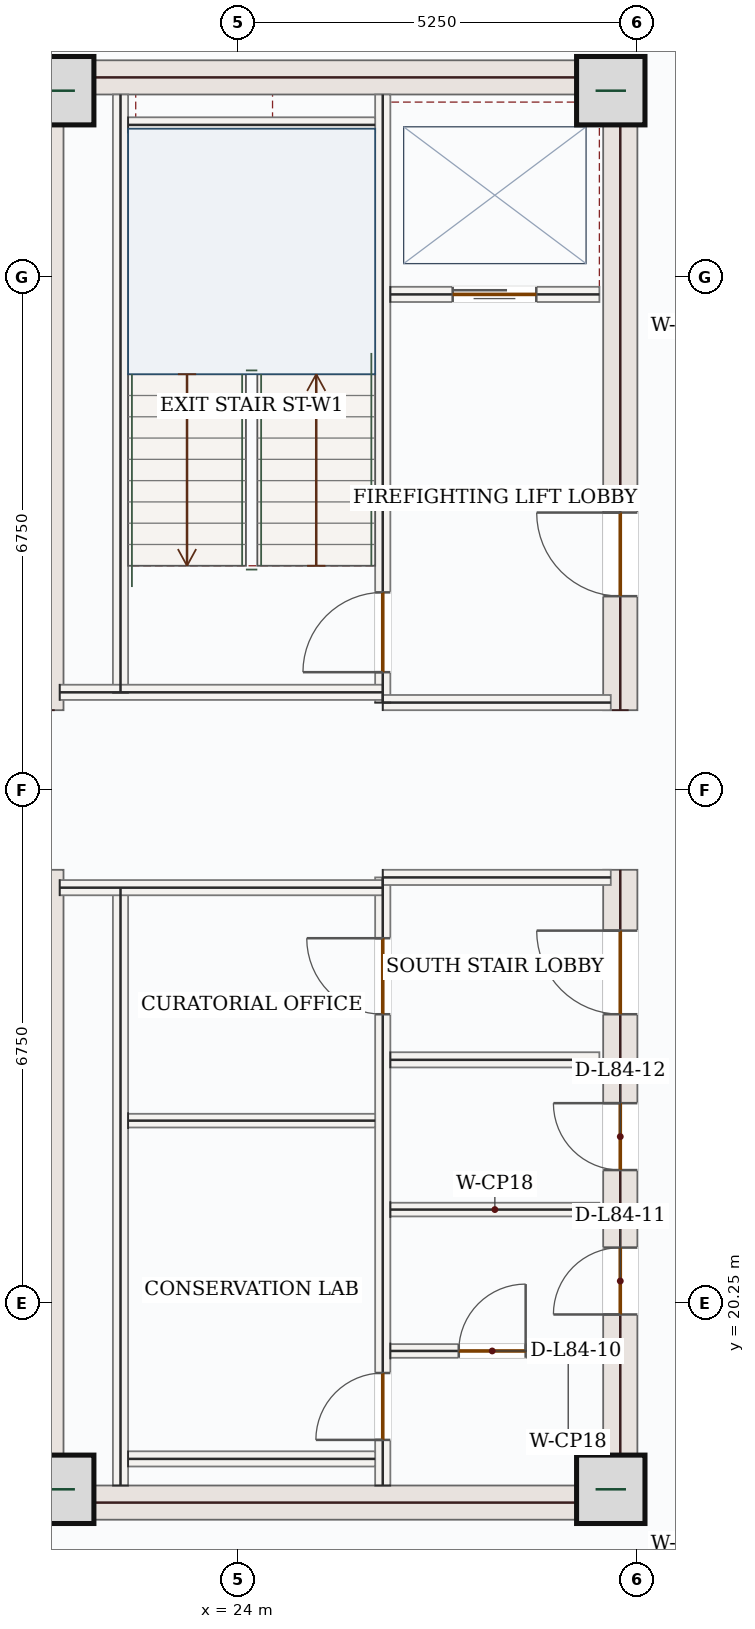
"""IFC4 building model, lengths in metres.
Left out: names, types, materials, properties, quantities, classifications, styles, units other than length and angle.
Written with IfcOpenShell. Run it as: python <this file> out.ifc"""

import sys

from ifc_helpers import new_model, si_unit, direction, frame, frame_2d, origin, origin_2d, place, context, subcontext, project, spatial, rectangle, extrude, source, transform, mapped, element, fill, save


model = new_model("IFC4")
c1 = context("Model", 3, precision=1e-05, world=origin(), true_north=direction((0.0, 1.0)))
c2 = subcontext(c1, "Body", "Model", "MODEL_VIEW")
j1 = project(units=[si_unit("LENGTHUNIT", "METRE"), si_unit("PLANEANGLEUNIT", "RADIAN")], contexts=[c1])
p1 = place(None, origin())
s1 = spatial("IfcSite", under=j1, at=p1, CompositionType="ELEMENT")
p2 = place(p1, origin())
s2 = spatial("IfcBuilding", under=s1, at=p2, CompositionType="ELEMENT")
p3 = place(p2, frame((0.0, 0.0, 346.05)))
s3 = spatial("IfcBuildingStorey", under=s2, at=p3, CompositionType="ELEMENT", Elevation=346.05)
m1 = source(origin(), c2, "Body", "SweptSolid", [
    extrude(rectangle(XDim=8.55, YDim=0.45, at=frame_2d((4.275, 0.0))), origin(), (0.0, 0.0, 1.0), 3.5),
])
for number, where, z_axis, x_axis in (
    (1, (21.475, 17.4, 0.0), (0.0, 0.0, 1.0), (0.0, 1.0, 0.0)),
    (2, (21.475, 28.05, 0.0), (0.0, 0.0, 1.0), (0.0, 1.0, 0.0)),
):
    element("IfcWall", number, at=place(p3, frame(where, z_axis=z_axis, x_axis=x_axis)), inside=s3, PredefinedType="SHEAR", context=c2, shape_type="MappedRepresentation", body=[
        mapped(m1, transform((0.0, 0.0, 0.0), x_axis=(1.0, 0.0, 0.0), y_axis=(0.0, 1.0, 0.0), z_axis=(0.0, 0.0, 1.0), scale=1.0)),
    ])
p4 = place(p3, frame((29.025, 17.4, 0.0), z_axis=(0.0, 0.0, 1.0), x_axis=(0.0, 1.0, 0.0)))
e3 = element("IfcWall", 3, at=p4, inside=s3, PredefinedType="SHEAR", context=c2, shape_type="SweptSolid", body=[
    extrude(rectangle(XDim=8.55, YDim=0.45, at=frame_2d((4.275, 0.0))), origin(), (0.0, 0.0, 1.0), 3.5),
])
p5 = place(p4, frame((6.65, 0.0, 0.0)))
e4 = element("IfcOpeningElement", 4, at=p5, cuts=e3, PredefinedType="OPENING", context=c2, shape_type="SweptSolid", body=[
    extrude(rectangle(XDim=1.1, YDim=2.2, at=frame_2d((0.55, 1.1))), frame((0.0, 0.235, 0.0), z_axis=(0.0, -1.0, 0.0), x_axis=(1.0, 0.0, 0.0)), (0.0, 0.0, 1.0), 0.47),
])
p6 = place(p4, frame((2.7, 0.0, 0.0)))
e5 = element("IfcOpeningElement", 5, at=p6, cuts=e3, PredefinedType="OPENING", context=c2, shape_type="SweptSolid", body=[
    extrude(rectangle(XDim=0.88, YDim=2.1, at=frame_2d((0.44, 1.05))), frame((0.0, 0.235, 0.0), z_axis=(0.0, -1.0, 0.0), x_axis=(1.0, 0.0, 0.0)), (0.0, 0.0, 1.0), 0.47),
])
p7 = place(p4, frame((4.6, 0.0, 0.0)))
e6 = element("IfcOpeningElement", 6, at=p7, cuts=e3, PredefinedType="OPENING", context=c2, shape_type="SweptSolid", body=[
    extrude(rectangle(XDim=0.88, YDim=2.1, at=frame_2d((0.44, 1.05))), frame((0.0, 0.235, 0.0), z_axis=(0.0, -1.0, 0.0), x_axis=(1.0, 0.0, 0.0)), (0.0, 0.0, 1.0), 0.47),
])
p8 = place(p3, frame((29.025, 28.05, 0.0), z_axis=(0.0, 0.0, 1.0), x_axis=(0.0, 1.0, 0.0)))
e7 = element("IfcWall", 7, at=p8, inside=s3, PredefinedType="SHEAR", context=c2, shape_type="SweptSolid", body=[
    extrude(rectangle(XDim=8.55, YDim=0.45, at=frame_2d((4.275, 0.0))), origin(), (0.0, 0.0, 1.0), 3.5),
])
p9 = place(p8, frame((1.5, 0.0, 0.0)))
e8 = element("IfcOpeningElement", 8, at=p9, cuts=e7, PredefinedType="OPENING", context=c2, shape_type="SweptSolid", body=[
    extrude(rectangle(XDim=1.1, YDim=2.2, at=frame_2d((0.55, 1.1))), frame((0.0, 0.235, 0.0), z_axis=(0.0, -1.0, 0.0), x_axis=(1.0, 0.0, 0.0)), (0.0, 0.0, 1.0), 0.47),
])
m2 = source(origin(), c2, "Body", "SweptSolid", [
    extrude(rectangle(XDim=7.1, YDim=0.45, at=frame_2d((3.55, 0.0))), origin(), (0.0, 0.0, 1.0), 3.5),
])
for number, where, z_axis, x_axis in (
    (9, (21.7, 17.625, 0.0), (0.0, 0.0, 1.0), (1.0, 0.0, 0.0)),
    (10, (21.7, 36.375, 0.0), (0.0, 0.0, 1.0), (1.0, 0.0, 0.0)),
):
    element("IfcWall", number, at=place(p3, frame(where, z_axis=z_axis, x_axis=x_axis)), inside=s3, PredefinedType="SHEAR", context=c2, shape_type="MappedRepresentation", body=[
        mapped(m2, transform((0.0, 0.0, 0.0), x_axis=(1.0, 0.0, 0.0), y_axis=(0.0, 1.0, 0.0), z_axis=(0.0, 0.0, 1.0), scale=1.0)),
    ])
m3 = source(origin(), c2, "Body", "SweptSolid", [
    extrude(rectangle(XDim=0.9, YDim=0.9, at=origin_2d()), origin(), (0.0, 0.0, 1.0), 3.75),
])
for number, where, z_axis, x_axis in (
    (11, (21.65, 17.8, 0.0), (0.0, 0.0, 1.0), (1.0, 0.0, 0.0)),
    (12, (28.9, 17.8, 0.0), (0.0, 0.0, 1.0), (1.0, 0.0, 0.0)),
    (13, (21.65, 36.2, 0.0), (0.0, 0.0, 1.0), (1.0, 0.0, 0.0)),
    (14, (28.9, 36.2, 0.0), (0.0, 0.0, 1.0), (1.0, 0.0, 0.0)),
):
    element("IfcColumn", number, at=place(p3, frame(where, z_axis=z_axis, x_axis=x_axis)), inside=s3, PredefinedType="COLUMN", context=c2, shape_type="MappedRepresentation", body=[
        mapped(m3, transform((0.0, 0.0, 0.0), x_axis=(1.0, 0.0, 0.0), y_axis=(0.0, 1.0, 0.0), z_axis=(0.0, 0.0, 1.0), scale=1.0)),
    ])
p10 = place(p3, frame((22.167, 14.994, 0.0), z_axis=(0.0, 0.0, 1.0), x_axis=(-0.681733754317, 0.731600361006, 0.0)))
e15 = element("IfcWall", 15, at=p10, inside=s3, PredefinedType="SOLIDWALL", context=c2, shape_type="SweptSolid", body=[
    extrude(rectangle(XDim=4.734, YDim=0.28, at=frame_2d((2.367, 0.0))), origin(), (0.0, 0.0, 1.0), 3.5),
])
p11 = place(p10, frame((1.617, 0.0, 0.85)))
e16 = element("IfcOpeningElement", 16, at=p11, cuts=e15, PredefinedType="OPENING", context=c2, shape_type="SweptSolid", body=[
    extrude(rectangle(XDim=1.5, YDim=1.5, at=frame_2d((0.75, 0.75))), frame((0.0, 0.15, 0.0), z_axis=(0.0, -1.0, 0.0), x_axis=(1.0, 0.0, 0.0)), (0.0, 0.0, 1.0), 0.3),
])
m4 = source(origin(), c2, "Body", "SweptSolid", [
    extrude(rectangle(XDim=7.87, YDim=0.2, at=frame_2d((3.935, 0.0))), origin(), (0.0, 0.0, 1.0), 3.5),
])
for number, where, z_axis, x_axis in (
    (17, (22.45, 17.85, 0.0), (0.0, 0.0, 1.0), (0.0, 1.0, 0.0)),
    (18, (22.45, 28.28, 0.0), (0.0, 0.0, 1.0), (0.0, 1.0, 0.0)),
):
    element("IfcWall", number, at=place(p3, frame(where, z_axis=z_axis, x_axis=x_axis)), inside=s3, PredefinedType="SOLIDWALL", context=c2, shape_type="MappedRepresentation", body=[
        mapped(m4, transform((0.0, 0.0, 0.0), x_axis=(1.0, 0.0, 0.0), y_axis=(0.0, 1.0, 0.0), z_axis=(0.0, 0.0, 1.0), scale=1.0)),
    ])
p12 = place(p3, frame((25.9, 17.85, 0.0), z_axis=(0.0, 0.0, 1.0), x_axis=(0.0, 1.0, 0.0)))
e19 = element("IfcWall", 19, at=p12, inside=s3, PredefinedType="SOLIDWALL", context=c2, shape_type="SweptSolid", body=[
    extrude(rectangle(XDim=8.0, YDim=0.2, at=frame_2d((4.0, 0.0))), origin(), (0.0, 0.0, 1.0), 3.5),
])
p13 = place(p12, frame((6.2, 0.0, 0.0)))
e20 = element("IfcOpeningElement", 20, at=p13, cuts=e19, PredefinedType="OPENING", context=c2, shape_type="SweptSolid", body=[
    extrude(rectangle(XDim=1.0, YDim=2.15, at=frame_2d((0.5, 1.075))), frame((0.0, 0.11, 0.0), z_axis=(0.0, -1.0, 0.0), x_axis=(1.0, 0.0, 0.0)), (0.0, 0.0, 1.0), 0.22),
])
p14 = place(p12, frame((0.6, 0.0, 0.0)))
e21 = element("IfcOpeningElement", 21, at=p14, cuts=e19, PredefinedType="OPENING", context=c2, shape_type="SweptSolid", body=[
    extrude(rectangle(XDim=0.88, YDim=2.1, at=frame_2d((0.44, 1.05))), frame((0.0, 0.11, 0.0), z_axis=(0.0, -1.0, 0.0), x_axis=(1.0, 0.0, 0.0)), (0.0, 0.0, 1.0), 0.22),
])
p15 = place(p3, frame((25.9, 28.15, 0.0), z_axis=(0.0, 0.0, 1.0), x_axis=(0.0, 1.0, 0.0)))
e22 = element("IfcWall", 22, at=p15, inside=s3, PredefinedType="SOLIDWALL", context=c2, shape_type="SweptSolid", body=[
    extrude(rectangle(XDim=8.0, YDim=0.2, at=frame_2d((4.0, 0.0))), origin(), (0.0, 0.0, 1.0), 3.5),
])
p16 = place(p15, frame((0.4, 0.0, 0.0)))
e23 = element("IfcOpeningElement", 23, at=p16, cuts=e22, PredefinedType="OPENING", context=c2, shape_type="SweptSolid", body=[
    extrude(rectangle(XDim=1.05, YDim=2.15, at=frame_2d((0.525, 1.075))), frame((0.0, 0.11, 0.0), z_axis=(0.0, -1.0, 0.0), x_axis=(1.0, 0.0, 0.0)), (0.0, 0.0, 1.0), 0.22),
])
m5 = source(origin(), c2, "Body", "SweptSolid", [
    extrude(rectangle(XDim=4.25, YDim=0.2, at=frame_2d((2.125, 0.0))), origin(), (0.0, 0.0, 1.0), 3.5),
])
p17 = place(p3, frame((21.65, 25.715, 0.0), z_axis=(0.0, 0.0, 1.0), x_axis=(1.0, 0.0, 0.0)))
e24 = element("IfcWall", 24, at=p17, inside=s3, PredefinedType="SOLIDWALL", context=c2, shape_type="MappedRepresentation", body=[
    mapped(m5, transform((0.0, 0.0, 0.0), x_axis=(1.0, 0.0, 0.0), y_axis=(0.0, 1.0, 0.0), z_axis=(0.0, 0.0, 1.0), scale=1.0)),
])
m6 = source(origin(), c2, "Body", "SweptSolid", [
    extrude(rectangle(XDim=3.0, YDim=0.2, at=frame_2d((1.5, 0.0))), origin(), (0.0, 0.0, 1.0), 3.5),
])
p18 = place(p3, frame((25.9, 25.85, 0.0), z_axis=(0.0, 0.0, 1.0), x_axis=(1.0, 0.0, 0.0)))
e25 = element("IfcWall", 25, at=p18, inside=s3, PredefinedType="SOLIDWALL", context=c2, shape_type="MappedRepresentation", body=[
    mapped(m6, transform((0.0, 0.0, 0.0), x_axis=(1.0, 0.0, 0.0), y_axis=(0.0, 1.0, 0.0), z_axis=(0.0, 0.0, 1.0), scale=1.0)),
])
p19 = place(p3, frame((21.65, 28.285, 0.0), z_axis=(0.0, 0.0, 1.0), x_axis=(1.0, 0.0, 0.0)))
e26 = element("IfcWall", 26, at=p19, inside=s3, PredefinedType="SOLIDWALL", context=c2, shape_type="MappedRepresentation", body=[
    mapped(m5, transform((0.0, 0.0, 0.0), x_axis=(1.0, 0.0, 0.0), y_axis=(0.0, 1.0, 0.0), z_axis=(0.0, 0.0, 1.0), scale=1.0)),
])
p20 = place(p3, frame((25.9, 28.15, 0.0), z_axis=(0.0, 0.0, 1.0), x_axis=(1.0, 0.0, 0.0)))
e27 = element("IfcWall", 27, at=p20, inside=s3, PredefinedType="SOLIDWALL", context=c2, shape_type="MappedRepresentation", body=[
    mapped(m6, transform((0.0, 0.0, 0.0), x_axis=(1.0, 0.0, 0.0), y_axis=(0.0, 1.0, 0.0), z_axis=(0.0, 0.0, 1.0), scale=1.0)),
])
m7 = source(origin(), c2, "Body", "SweptSolid", [
    extrude(rectangle(XDim=3.25, YDim=0.2, at=frame_2d((1.625, 0.0))), origin(), (0.0, 0.0, 1.0), 3.5),
])
for number, where, z_axis, x_axis in (
    (28, (22.55, 35.75, 0.0), (0.0, 0.0, 1.0), (1.0, 0.0, 0.0)),
    (29, (22.55, 18.2, 0.0), (0.0, 0.0, 1.0), (1.0, 0.0, 0.0)),
):
    element("IfcWall", number, at=place(p3, frame(where, z_axis=z_axis, x_axis=x_axis)), inside=s3, PredefinedType="SOLIDWALL", context=c2, shape_type="MappedRepresentation", body=[
        mapped(m7, transform((0.0, 0.0, 0.0), x_axis=(1.0, 0.0, 0.0), y_axis=(0.0, 1.0, 0.0), z_axis=(0.0, 0.0, 1.0), scale=1.0)),
    ])
m8 = source(origin(), c2, "Body", "SweptSolid", [
    extrude(rectangle(XDim=3.25, YDim=0.18, at=frame_2d((1.625, 0.0))), origin(), (0.0, 0.0, 1.0), 3.5),
])
p21 = place(p3, frame((22.55, 22.65, 0.0), z_axis=(0.0, 0.0, 1.0), x_axis=(1.0, 0.0, 0.0)))
e30 = element("IfcWall", 30, at=p21, inside=s3, PredefinedType="PARTITIONING", context=c2, shape_type="MappedRepresentation", body=[
    mapped(m8, transform((0.0, 0.0, 0.0), x_axis=(1.0, 0.0, 0.0), y_axis=(0.0, 1.0, 0.0), z_axis=(0.0, 0.0, 1.0), scale=1.0)),
])
p22 = place(p3, frame((26.0, 33.52, 0.0), z_axis=(0.0, 0.0, 1.0), x_axis=(1.0, 0.0, 0.0)))
e31 = element("IfcWall", 31, at=p22, inside=s3, PredefinedType="SOLIDWALL", context=c2, shape_type="SweptSolid", body=[
    extrude(rectangle(XDim=2.75, YDim=0.2, at=frame_2d((1.375, 0.0))), origin(), (0.0, 0.0, 1.0), 3.5),
])
p23 = place(p22, frame((0.82, 0.0, 0.0)))
e32 = element("IfcOpeningElement", 32, at=p23, cuts=e31, PredefinedType="OPENING", context=c2, shape_type="SweptSolid", body=[
    extrude(rectangle(XDim=1.1, YDim=2.15, at=frame_2d((0.55, 1.075))), frame((0.0, 0.11, 0.0), z_axis=(0.0, -1.0, 0.0), x_axis=(1.0, 0.0, 0.0)), (0.0, 0.0, 1.0), 0.22),
])
m9 = source(origin(), c2, "Body", "SweptSolid", [
    extrude(rectangle(XDim=2.75, YDim=0.2, at=frame_2d((1.375, 0.0))), origin(), (0.0, 0.0, 1.0), 3.5),
])
p24 = place(p3, frame((26.0, 23.45, 0.0), z_axis=(0.0, 0.0, 1.0), x_axis=(1.0, 0.0, 0.0)))
e33 = element("IfcWall", 33, at=p24, inside=s3, PredefinedType="SOLIDWALL", context=c2, shape_type="MappedRepresentation", body=[
    mapped(m9, transform((0.0, 0.0, 0.0), x_axis=(1.0, 0.0, 0.0), y_axis=(0.0, 1.0, 0.0), z_axis=(0.0, 0.0, 1.0), scale=1.0)),
])
p25 = place(p3, frame((26.0, 19.62, 0.0), z_axis=(0.0, 0.0, 1.0), x_axis=(1.0, 0.0, 0.0)))
e34 = element("IfcWall", 34, at=p25, inside=s3, PredefinedType="PARTITIONING", context=c2, shape_type="SweptSolid", body=[
    extrude(rectangle(XDim=2.75, YDim=0.18, at=frame_2d((1.375, 0.0))), origin(), (0.0, 0.0, 1.0), 3.5),
])
p26 = place(p25, frame((0.9, 0.0, 0.0)))
e35 = element("IfcOpeningElement", 35, at=p26, cuts=e34, PredefinedType="OPENING", context=c2, shape_type="SweptSolid", body=[
    extrude(rectangle(XDim=0.88, YDim=2.1, at=frame_2d((0.44, 1.05))), frame((0.0, 0.1, 0.0), z_axis=(0.0, -1.0, 0.0), x_axis=(1.0, 0.0, 0.0)), (0.0, 0.0, 1.0), 0.2),
])
m10 = source(origin(), c2, "Body", "SweptSolid", [
    extrude(rectangle(XDim=2.75, YDim=0.18, at=frame_2d((1.375, 0.0))), origin(), (0.0, 0.0, 1.0), 3.5),
])
p27 = place(p3, frame((26.0, 21.48, 0.0), z_axis=(0.0, 0.0, 1.0), x_axis=(1.0, 0.0, 0.0)))
e36 = element("IfcWall", 36, at=p27, inside=s3, PredefinedType="PARTITIONING", context=c2, shape_type="MappedRepresentation", body=[
    mapped(m10, transform((0.0, 0.0, 0.0), x_axis=(1.0, 0.0, 0.0), y_axis=(0.0, 1.0, 0.0), z_axis=(0.0, 0.0, 1.0), scale=1.0)),
])
m11 = source(origin(), c2, "Body", "SweptSolid", [
    extrude(rectangle(XDim=1.05, YDim=2.15, at=frame_2d((0.525, 1.075))), frame((0.0, 0.025, 0.0), z_axis=(0.0, -1.0, 0.0), x_axis=(1.0, 0.0, 0.0)), (0.0, 0.0, 1.0), 0.05),
])
p28 = place(p16, origin())
e37 = element("IfcDoor", 37, at=p28, inside=s3, OperationType="SINGLE_SWING_LEFT", PredefinedType="DOOR", context=c2, shape_type="MappedRepresentation", body=[
    mapped(m11, transform((0.0, 0.0, 0.0), x_axis=(1.0, 0.0, 0.0), y_axis=(0.0, 1.0, 0.0), z_axis=(0.0, 0.0, 1.0), scale=1.0)),
])
fill(e23, e37)
m12 = source(origin(), c2, "Body", "SweptSolid", [
    extrude(rectangle(XDim=1.0, YDim=2.15, at=frame_2d((0.5, 1.075))), frame((0.0, 0.025, 0.0), z_axis=(0.0, -1.0, 0.0), x_axis=(1.0, 0.0, 0.0)), (0.0, 0.0, 1.0), 0.05),
])
p29 = place(p13, origin())
e38 = element("IfcDoor", 38, at=p29, inside=s3, OperationType="SINGLE_SWING_RIGHT", PredefinedType="DOOR", context=c2, shape_type="MappedRepresentation", body=[
    mapped(m12, transform((0.0, 0.0, 0.0), x_axis=(1.0, 0.0, 0.0), y_axis=(0.0, 1.0, 0.0), z_axis=(0.0, 0.0, 1.0), scale=1.0)),
])
fill(e20, e38)
m13 = source(origin(), c2, "Body", "SweptSolid", [
    extrude(rectangle(XDim=0.88, YDim=2.1, at=frame_2d((0.44, 1.05))), frame((0.0, 0.025, 0.0), z_axis=(0.0, -1.0, 0.0), x_axis=(1.0, 0.0, 0.0)), (0.0, 0.0, 1.0), 0.05),
])
p30 = place(p14, origin())
e39 = element("IfcDoor", 39, at=p30, inside=s3, OperationType="SINGLE_SWING_LEFT", PredefinedType="DOOR", context=c2, shape_type="MappedRepresentation", body=[
    mapped(m13, transform((0.0, 0.0, 0.0), x_axis=(1.0, 0.0, 0.0), y_axis=(0.0, 1.0, 0.0), z_axis=(0.0, 0.0, 1.0), scale=1.0)),
])
fill(e21, e39)
m14 = source(origin(), c2, "Body", "SweptSolid", [
    extrude(rectangle(XDim=1.1, YDim=2.15, at=frame_2d((0.55, 1.075))), frame((0.0, 0.025, 0.0), z_axis=(0.0, -1.0, 0.0), x_axis=(1.0, 0.0, 0.0)), (0.0, 0.0, 1.0), 0.05),
])
p31 = place(p23, origin())
e40 = element("IfcDoor", 40, at=p31, inside=s3, OperationType="DOUBLE_DOOR_SLIDING", PredefinedType="DOOR", context=c2, shape_type="MappedRepresentation", body=[
    mapped(m14, transform((0.0, 0.0, 0.0), x_axis=(1.0, 0.0, 0.0), y_axis=(0.0, 1.0, 0.0), z_axis=(0.0, 0.0, 1.0), scale=1.0)),
])
fill(e32, e40)
m15 = source(origin(), c2, "Body", "SweptSolid", [
    extrude(rectangle(XDim=1.1, YDim=2.2, at=frame_2d((0.55, 1.1))), frame((0.0, 0.025, 0.0), z_axis=(0.0, -1.0, 0.0), x_axis=(1.0, 0.0, 0.0)), (0.0, 0.0, 1.0), 0.05),
])
p32 = place(p9, origin())
e41 = element("IfcDoor", 41, at=p32, inside=s3, OperationType="SINGLE_SWING_RIGHT", PredefinedType="DOOR", context=c2, shape_type="MappedRepresentation", body=[
    mapped(m15, transform((0.0, 0.0, 0.0), x_axis=(1.0, 0.0, 0.0), y_axis=(0.0, 1.0, 0.0), z_axis=(0.0, 0.0, 1.0), scale=1.0)),
])
fill(e8, e41)
p33 = place(p5, origin())
e42 = element("IfcDoor", 42, at=p33, inside=s3, OperationType="SINGLE_SWING_RIGHT", PredefinedType="DOOR", context=c2, shape_type="MappedRepresentation", body=[
    mapped(m15, transform((0.0, 0.0, 0.0), x_axis=(1.0, 0.0, 0.0), y_axis=(0.0, 1.0, 0.0), z_axis=(0.0, 0.0, 1.0), scale=1.0)),
])
fill(e4, e42)
p34 = place(p26, origin())
e43 = element("IfcDoor", 43, at=p34, inside=s3, OperationType="SINGLE_SWING_RIGHT", PredefinedType="DOOR", context=c2, shape_type="MappedRepresentation", body=[
    mapped(m13, transform((0.0, 0.0, 0.0), x_axis=(1.0, 0.0, 0.0), y_axis=(0.0, 1.0, 0.0), z_axis=(0.0, 0.0, 1.0), scale=1.0)),
])
fill(e35, e43)
p35 = place(p6, origin())
e44 = element("IfcDoor", 44, at=p35, inside=s3, OperationType="SINGLE_SWING_LEFT", PredefinedType="DOOR", context=c2, shape_type="MappedRepresentation", body=[
    mapped(m13, transform((0.0, 0.0, 0.0), x_axis=(1.0, 0.0, 0.0), y_axis=(0.0, 1.0, 0.0), z_axis=(0.0, 0.0, 1.0), scale=1.0)),
])
fill(e5, e44)
p36 = place(p7, origin())
e45 = element("IfcDoor", 45, at=p36, inside=s3, OperationType="SINGLE_SWING_RIGHT", PredefinedType="DOOR", context=c2, shape_type="MappedRepresentation", body=[
    mapped(m13, transform((0.0, 0.0, 0.0), x_axis=(1.0, 0.0, 0.0), y_axis=(0.0, 1.0, 0.0), z_axis=(0.0, 0.0, 1.0), scale=1.0)),
])
fill(e6, e45)
save(model, sys.argv[1])
